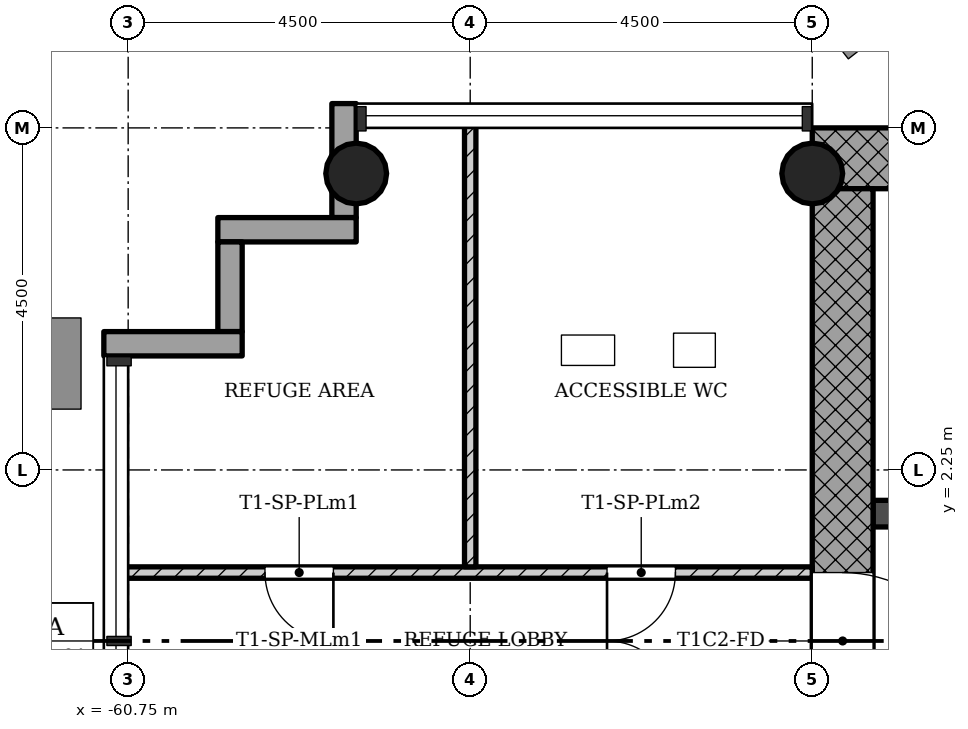
"""IFC4 building model, lengths in metres.
Left out: names, types, materials, properties, quantities, classifications, styles, units other than length and angle.
Written with IfcOpenShell. Run it as: python <this file> out.ifc"""

import sys

from ifc_helpers import new_model, si_unit, direction, frame, frame_2d, origin, origin_2d, place, context, subcontext, project, spatial, rectangle, hollow_circle, extrude, element, fill, save


model = new_model("IFC4")
c1 = context("Model", 3, precision=1e-05, world=origin(), true_north=direction((0.0, 1.0)))
c2 = subcontext(c1, "Body", "Model", "MODEL_VIEW")
j1 = project(units=[si_unit("LENGTHUNIT", "METRE"), si_unit("PLANEANGLEUNIT", "RADIAN")], contexts=[c1])
p1 = place(None, origin())
s1 = spatial("IfcSite", under=j1, at=p1, CompositionType="ELEMENT")
p2 = place(p1, origin())
s2 = spatial("IfcBuilding", under=s1, at=p2, CompositionType="ELEMENT")
p3 = place(p2, frame((0.0, 0.0, 128.7)))
s3 = spatial("IfcBuildingStorey", under=s2, at=p3, CompositionType="ELEMENT", Elevation=128.7)
p4 = place(p3, frame((-43.55, 6.35, 0.0), z_axis=(0.0, 0.0, 1.0), x_axis=(-1.0, 0.0, 0.0)))
e1 = element("IfcWall", 1, at=p4, inside=s3, PredefinedType="SHEAR", context=c2, shape_type="SweptSolid", body=[
    extrude(rectangle(XDim=8.2, YDim=0.8, at=frame_2d((4.1, 0.0))), origin(), (0.0, 0.0, 1.0), 5.0),
])
p5 = place(p3, frame((-51.35, 5.95, 0.0), z_axis=(0.0, 0.0, 1.0), x_axis=(0.0, -1.0, 0.0)))
e2 = element("IfcWall", 2, at=p5, inside=s3, PredefinedType="SHEAR", context=c2, shape_type="SweptSolid", body=[
    extrude(rectangle(XDim=12.7, YDim=0.8, at=frame_2d((6.35, 0.0))), origin(), (0.0, 0.0, 1.0), 5.0),
])
p6 = place(p5, frame((5.05, 0.0, 0.0)))
e3 = element("IfcOpeningElement", 3, at=p6, cuts=e2, PredefinedType="OPENING", context=c2, shape_type="SweptSolid", body=[
    extrude(rectangle(XDim=1.8, YDim=2.1, at=frame_2d((0.9, 1.05))), frame((0.0, 0.41, 0.0), z_axis=(0.0, -1.0, 0.0), x_axis=(1.0, 0.0, 0.0)), (0.0, 0.0, 1.0), 0.82),
])
p7 = place(p3, frame((-50.95, 1.675, 0.0), z_axis=(0.0, 0.0, 1.0), x_axis=(1.0, 0.0, 0.0)))
e4 = element("IfcWall", 4, at=p7, inside=s3, PredefinedType="SHEAR", context=c2, shape_type="SweptSolid", body=[
    extrude(rectangle(XDim=7.4, YDim=0.35, at=frame_2d((3.7, 0.0))), origin(), (0.0, 0.0, 1.0), 5.0),
])
p8 = place(p7, frame((5.35, 0.0, 0.0)))
e5 = element("IfcOpeningElement", 5, at=p8, cuts=e4, PredefinedType="OPENING", context=c2, shape_type="SweptSolid", body=[
    extrude(rectangle(XDim=1.1, YDim=2.1, at=frame_2d((0.55, 1.05))), frame((0.0, 0.185, 0.0), z_axis=(0.0, -1.0, 0.0), x_axis=(1.0, 0.0, 0.0)), (0.0, 0.0, 1.0), 0.37),
])
p9 = place(p7, frame((3.2, 0.0, 0.0)))
e6 = element("IfcOpeningElement", 6, at=p9, cuts=e4, PredefinedType="OPENING", context=c2, shape_type="SweptSolid", body=[
    extrude(rectangle(XDim=1.1, YDim=2.1, at=frame_2d((0.55, 1.05))), frame((0.0, 0.185, 0.0), z_axis=(0.0, -1.0, 0.0), x_axis=(1.0, 0.0, 0.0)), (0.0, 0.0, 1.0), 0.37),
])
p10 = place(p7, frame((1.0, 0.0, 0.0)))
e7 = element("IfcOpeningElement", 7, at=p10, cuts=e4, PredefinedType="OPENING", context=c2, shape_type="SweptSolid", body=[
    extrude(rectangle(XDim=1.1, YDim=2.1, at=frame_2d((0.55, 1.05))), frame((0.0, 0.185, 0.0), z_axis=(0.0, -1.0, 0.0), x_axis=(1.0, 0.0, 0.0)), (0.0, 0.0, 1.0), 0.37),
])
for number, where, z_axis, x_axis in (
    (8, (-51.75, 6.15, 0.0), (0.0, 0.0, 1.0), (1.0, 0.0, 0.0)),
    (9, (-57.75, 6.15, 0.0), (0.0, 0.0, 1.0), (1.0, 0.0, 0.0)),
):
    element("IfcColumn", number, at=place(p3, frame(where, z_axis=z_axis, x_axis=x_axis)), inside=s3, PredefinedType="COLUMN", context=c2, shape_type="SweptSolid", body=[
        extrude(hollow_circle(Radius=0.4, WallThickness=0.028, at=origin_2d()), origin(), (0.0, 0.0, 1.0), 5.0),
    ])
p11 = place(p3, frame((-57.91, 7.07, -0.3), z_axis=(0.0, 0.0, 1.0), x_axis=(0.0, -1.0, 0.0)))
e10 = element("IfcWall", 10, at=p11, inside=s3, PredefinedType="STANDARD", context=c2, shape_type="SweptSolid", body=[
    extrude(rectangle(XDim=1.5, YDim=0.32, at=frame_2d((0.75, 0.0))), origin(), (0.0, 0.0, 1.0), 5.0),
])
p12 = place(p3, frame((-57.75, 5.41, -0.3), z_axis=(0.0, 0.0, 1.0), x_axis=(-1.0, 0.0, 0.0)))
e11 = element("IfcWall", 11, at=p12, inside=s3, PredefinedType="STANDARD", context=c2, shape_type="SweptSolid", body=[
    extrude(rectangle(XDim=1.82, YDim=0.32, at=frame_2d((0.91, 0.0))), origin(), (0.0, 0.0, 1.0), 5.0),
])
p13 = place(p3, frame((-59.41, 5.25, -0.3), z_axis=(0.0, 0.0, 1.0), x_axis=(0.0, -1.0, 0.0)))
e12 = element("IfcWall", 12, at=p13, inside=s3, PredefinedType="STANDARD", context=c2, shape_type="SweptSolid", body=[
    extrude(rectangle(XDim=1.18, YDim=0.32, at=frame_2d((0.59, 0.0))), origin(), (0.0, 0.0, 1.0), 5.0),
])
p14 = place(p3, frame((-59.25, 3.91, -0.3), z_axis=(0.0, 0.0, 1.0), x_axis=(-1.0, 0.0, 0.0)))
e13 = element("IfcWall", 13, at=p14, inside=s3, PredefinedType="STANDARD", context=c2, shape_type="SweptSolid", body=[
    extrude(rectangle(XDim=1.82, YDim=0.32, at=frame_2d((0.91, 0.0))), origin(), (0.0, 0.0, 1.0), 5.0),
])
p15 = place(p3, frame((-60.85, 0.9, 0.0), z_axis=(0.0, 0.0, 1.0), x_axis=(1.0, 0.0, 0.0)))
e14 = element("IfcWall", 14, at=p15, inside=s3, PredefinedType="PARTITIONING", context=c2, shape_type="SweptSolid", body=[
    extrude(rectangle(XDim=9.1, YDim=0.15, at=frame_2d((4.55, 0.0))), origin(), (0.0, 0.0, 1.0), 4.58),
])
p16 = place(p15, frame((1.9, 0.0, 0.0)))
e15 = element("IfcOpeningElement", 15, at=p16, cuts=e14, PredefinedType="OPENING", context=c2, shape_type="SweptSolid", body=[
    extrude(rectangle(XDim=0.9, YDim=2.1, at=frame_2d((0.45, 1.05))), frame((0.0, 0.085, 0.0), z_axis=(0.0, -1.0, 0.0), x_axis=(1.0, 0.0, 0.0)), (0.0, 0.0, 1.0), 0.17),
])
p17 = place(p15, frame((6.4, 0.0, 0.0)))
e16 = element("IfcOpeningElement", 16, at=p17, cuts=e14, PredefinedType="OPENING", context=c2, shape_type="SweptSolid", body=[
    extrude(rectangle(XDim=0.9, YDim=2.1, at=frame_2d((0.45, 1.05))), frame((0.0, 0.085, 0.0), z_axis=(0.0, -1.0, 0.0), x_axis=(1.0, 0.0, 0.0)), (0.0, 0.0, 1.0), 0.17),
])
p18 = place(p3, frame((-56.25, 0.975, 0.0), z_axis=(0.0, 0.0, 1.0), x_axis=(0.0, 1.0, 0.0)))
e17 = element("IfcWall", 17, at=p18, inside=s3, PredefinedType="PARTITIONING", context=c2, shape_type="SweptSolid", body=[
    extrude(rectangle(XDim=5.875, YDim=0.15, at=frame_2d((2.938, 0.0))), origin(), (0.0, 0.0, 1.0), 4.58),
])
p19 = place(p16, origin())
e18 = element("IfcDoor", 18, at=p19, inside=s3, OperationType="SINGLE_SWING_RIGHT", PredefinedType="DOOR", context=c2, shape_type="SweptSolid", body=[
    extrude(rectangle(XDim=0.9, YDim=2.1, at=frame_2d((0.45, 1.05))), frame((0.0, 0.025, 0.0), z_axis=(0.0, -1.0, 0.0), x_axis=(1.0, 0.0, 0.0)), (0.0, 0.0, 1.0), 0.05),
])
fill(e15, e18)
p20 = place(p17, origin())
e19 = element("IfcDoor", 19, at=p20, inside=s3, OperationType="SINGLE_SWING_LEFT", PredefinedType="DOOR", context=c2, shape_type="SweptSolid", body=[
    extrude(rectangle(XDim=0.9, YDim=2.1, at=frame_2d((0.45, 1.05))), frame((0.0, 0.025, 0.0), z_axis=(0.0, -1.0, 0.0), x_axis=(1.0, 0.0, 0.0)), (0.0, 0.0, 1.0), 0.05),
])
fill(e16, e19)
p21 = place(p6, origin())
e20 = element("IfcDoor", 20, at=p21, inside=s3, OperationType="SINGLE_SWING_LEFT", PredefinedType="DOOR", context=c2, shape_type="SweptSolid", body=[
    extrude(rectangle(XDim=1.8, YDim=2.1, at=frame_2d((0.9, 1.05))), frame((0.0, 0.025, 0.0), z_axis=(0.0, -1.0, 0.0), x_axis=(1.0, 0.0, 0.0)), (0.0, 0.0, 1.0), 0.05),
])
fill(e3, e20)
save(model, sys.argv[1])
